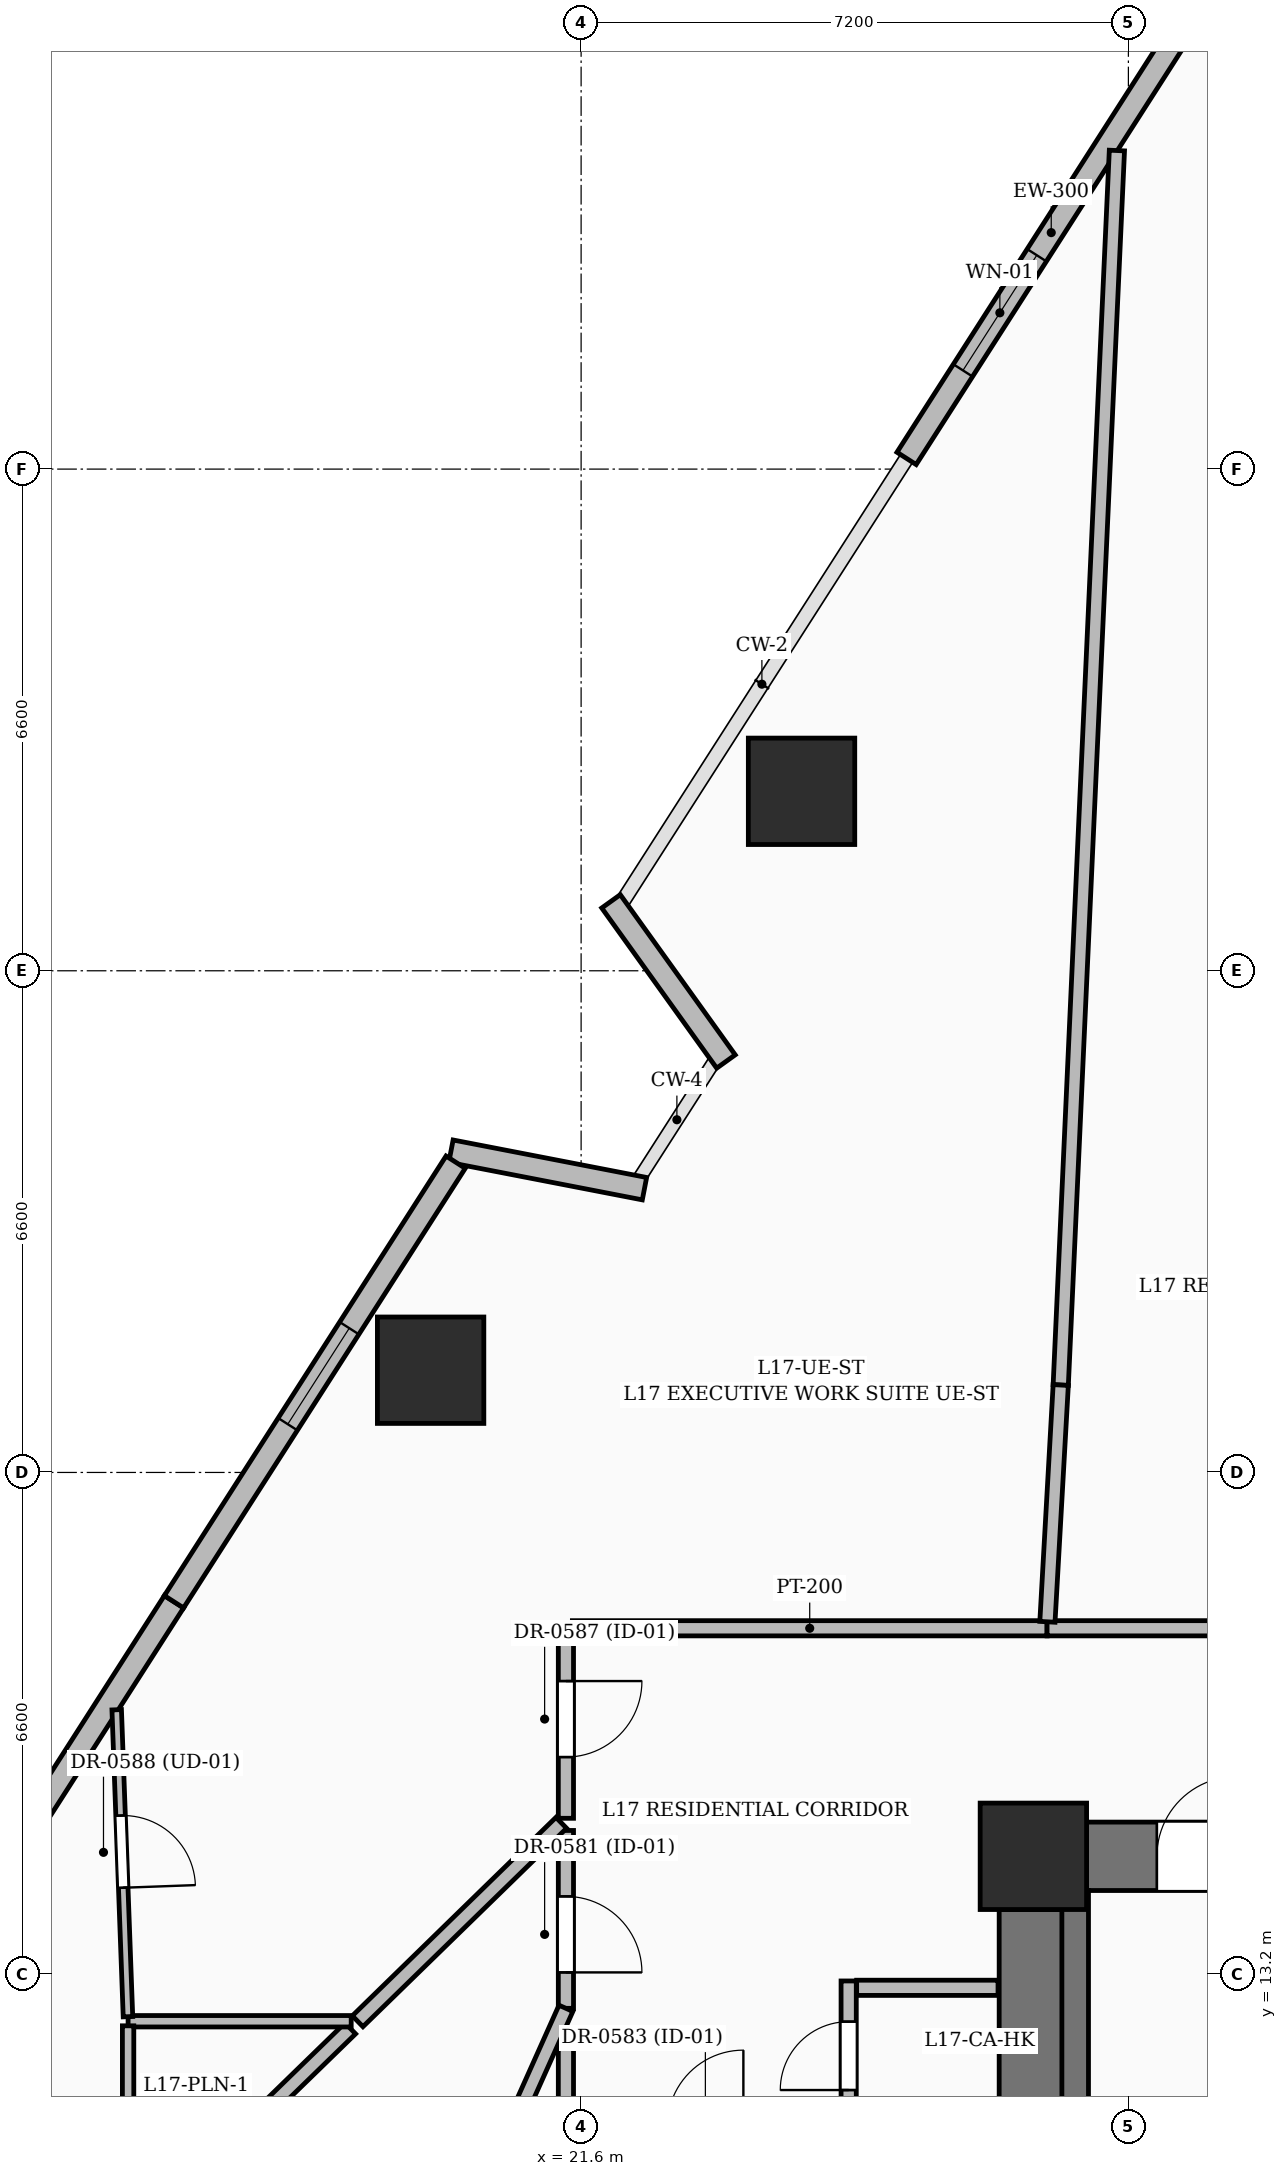
"""IFC4 building model, lengths in metres.
Left out: names, types, materials, properties, quantities, classifications, styles, units other than length and angle.
Written with IfcOpenShell. Run it as: python <this file> out.ifc"""

import sys

from ifc_helpers import new_model, si_unit, direction, frame, frame_2d, origin, origin_2d, place, context, subcontext, project, spatial, rectangle, extrude, element, fill, save


model = new_model("IFC4")
c1 = context("Model", 3, precision=1e-05, world=origin(), true_north=direction((0.0, 1.0)))
c2 = subcontext(c1, "Body", "Model", "MODEL_VIEW")
j1 = project(units=[si_unit("LENGTHUNIT", "METRE"), si_unit("PLANEANGLEUNIT", "RADIAN")], contexts=[c1])
p1 = place(None, origin())
s1 = spatial("IfcSite", under=j1, at=p1, CompositionType="ELEMENT")
p2 = place(p1, origin())
s2 = spatial("IfcBuilding", under=s1, at=p2, CompositionType="ELEMENT")
p3 = place(p2, frame((0.0, 0.0, 71.4)))
s3 = spatial("IfcBuildingStorey", under=s2, at=p3, CompositionType="ELEMENT", Elevation=71.4)
p4 = place(p3, frame((27.55, 14.75, 0.0), z_axis=(0.0, 0.0, 1.0), x_axis=(1.0, 0.0, 0.0)))
e1 = element("IfcColumn", 1, at=p4, inside=s3, PredefinedType="COLUMN", context=c2, shape_type="SweptSolid", body=[
    extrude(rectangle(XDim=1.4, YDim=1.4, at=origin_2d()), origin(), (0.0, 0.0, 1.0), 3.6),
])
p5 = place(p3, frame((28.25, 14.75, 0.0), z_axis=(0.0, 0.0, 1.0), x_axis=(1.0, 0.0, 0.0)))
e2 = element("IfcWall", 2, at=p5, inside=s3, PredefinedType="SHEAR", context=c2, shape_type="SweptSolid", body=[
    extrude(rectangle(XDim=6.2, YDim=0.9, at=frame_2d((3.1, 0.0))), origin(), (0.0, 0.0, 1.0), 3.6),
])
p6 = place(p5, frame((0.925, 0.0, 0.0)))
e3 = element("IfcOpeningElement", 3, at=p6, cuts=e2, PredefinedType="OPENING", context=c2, shape_type="SweptSolid", body=[
    extrude(rectangle(XDim=1.05, YDim=2.15, at=frame_2d((0.525, 1.075))), frame((0.0, 0.46, 0.0), z_axis=(0.0, -1.0, 0.0), x_axis=(1.0, 0.0, 0.0)), (0.0, 0.0, 1.0), 0.92),
])
p7 = place(p3, frame((27.55, 5.25, 0.0), z_axis=(0.0, 0.0, 1.0), x_axis=(0.0, 1.0, 0.0)))
e4 = element("IfcWall", 4, at=p7, inside=s3, PredefinedType="SHEAR", context=c2, shape_type="SweptSolid", body=[
    extrude(rectangle(XDim=8.8, YDim=0.9, at=frame_2d((4.4, 0.0))), origin(), (0.0, 0.0, 1.0), 3.6),
])
p8 = place(p3, frame((28.1, 5.2, 0.0), z_axis=(0.0, 0.0, 1.0), x_axis=(0.0, 1.0, 0.0)))
e5 = element("IfcWall", 5, at=p8, inside=s3, PredefinedType="SOLIDWALL", context=c2, shape_type="SweptSolid", body=[
    extrude(rectangle(XDim=9.1, YDim=0.35, at=frame_2d((4.55, 0.0))), origin(), (0.0, 0.0, 1.0), 3.6),
])
for number, where, z_axis, x_axis in (
    (6, (24.5, 28.761, 0.0), (0.0, 0.0, 1.0), (1.0, 0.0, 0.0)),
    (7, (19.62, 21.145, 0.0), (0.0, 0.0, 1.0), (1.0, 0.0, 0.0)),
):
    element("IfcColumn", number, at=place(p3, frame(where, z_axis=z_axis, x_axis=x_axis)), inside=s3, PredefinedType="COLUMN", context=c2, shape_type="SweptSolid", body=[
        extrude(rectangle(XDim=1.4, YDim=1.4, at=origin_2d()), origin(), (0.0, 0.0, 1.0), 3.6),
    ])
p9 = place(p3, frame((19.888, 24.027, 0.0), z_axis=(0.0, 0.0, 1.0), x_axis=(0.981746971615, -0.190191702567, 0.0)))
e8 = element("IfcWall", 8, at=p9, inside=s3, PredefinedType="SOLIDWALL", context=c2, shape_type="SweptSolid", body=[
    extrude(rectangle(XDim=2.593, YDim=0.3, at=frame_2d((1.296, 0.0))), origin(), (0.0, 0.0, 1.0), 2.375),
])
p10 = place(p3, frame((23.506, 25.206, 0.0), z_axis=(0.0, 0.0, 1.0), x_axis=(-0.58299973372, 0.812472344442, 0.0)))
e9 = element("IfcWall", 9, at=p10, inside=s3, PredefinedType="SOLIDWALL", context=c2, shape_type="SweptSolid", body=[
    extrude(rectangle(XDim=2.594, YDim=0.3, at=frame_2d((1.297, 0.0))), origin(), (0.0, 0.0, 1.0), 2.375),
])
p11 = place(p3, frame((25.882, 33.141, 0.0), z_axis=(0.0, 0.0, 1.0), x_axis=(0.539517071838, 0.841974660661, 0.0)))
e10 = element("IfcWall", 10, at=p11, inside=s3, PredefinedType="SOLIDWALL", context=c2, shape_type="SweptSolid", body=[
    extrude(rectangle(XDim=7.056, YDim=0.3, at=frame_2d((3.528, 0.0))), origin(), (0.0, 0.0, 1.0), 3.35),
])
p12 = place(p11, frame((1.375, 0.0, 0.6)))
e11 = element("IfcOpeningElement", 11, at=p12, cuts=e10, PredefinedType="OPENING", context=c2, shape_type="SweptSolid", body=[
    extrude(rectangle(XDim=1.8, YDim=2.1, at=frame_2d((0.9, 1.05))), frame((0.0, 0.16, 0.0), z_axis=(0.0, -1.0, 0.0), x_axis=(1.0, 0.0, 0.0)), (0.0, 0.0, 1.0), 0.32),
])
p13 = place(p3, frame((12.386, 12.079, 0.0), z_axis=(0.0, 0.0, 1.0), x_axis=(0.539509086386, 0.841979777493, 0.0)))
e12 = element("IfcWall", 12, at=p13, inside=s3, PredefinedType="SOLIDWALL", context=c2, shape_type="SweptSolid", body=[
    extrude(rectangle(XDim=7.149, YDim=0.3, at=frame_2d((3.574, 0.0))), origin(), (0.0, 0.0, 1.0), 3.35),
])
p14 = place(p13, frame((1.85, 0.0, 0.55)))
e13 = element("IfcOpeningElement", 13, at=p14, cuts=e12, PredefinedType="OPENING", context=c2, shape_type="SweptSolid", body=[
    extrude(rectangle(XDim=1.6, YDim=2.2, at=frame_2d((0.8, 1.1))), frame((0.0, 0.16, 0.0), z_axis=(0.0, -1.0, 0.0), x_axis=(1.0, 0.0, 0.0)), (0.0, 0.0, 1.0), 0.32),
])
p15 = place(p3, frame((16.243, 18.099, 0.0), z_axis=(0.0, 0.0, 1.0), x_axis=(0.539533693544, 0.841964009641, 0.0)))
e14 = element("IfcWall", 14, at=p15, inside=s3, PredefinedType="SOLIDWALL", context=c2, shape_type="SweptSolid", body=[
    extrude(rectangle(XDim=6.869, YDim=0.3, at=frame_2d((3.435, 0.0))), origin(), (0.0, 0.0, 1.0), 3.35),
])
p16 = place(p15, frame((2.775, 0.0, 0.6)))
e15 = element("IfcOpeningElement", 15, at=p16, cuts=e14, PredefinedType="OPENING", context=c2, shape_type="SweptSolid", body=[
    extrude(rectangle(XDim=1.5, YDim=2.1, at=frame_2d((0.75, 1.05))), frame((0.0, 0.16, 0.0), z_axis=(0.0, -1.0, 0.0), x_axis=(1.0, 0.0, 0.0)), (0.0, 0.0, 1.0), 0.32),
])
p17 = place(p3, frame((25.12, 11.37, 0.0), z_axis=(0.0, 0.0, 1.0), x_axis=(0.0, 1.0, 0.0)))
e16 = element("IfcWall", 16, at=p17, inside=s3, PredefinedType="PARTITIONING", context=c2, shape_type="SweptSolid", body=[
    extrude(rectangle(XDim=1.74, YDim=0.2, at=frame_2d((0.87, 0.0))), origin(), (0.0, 0.0, 1.0), 3.35),
])
p18 = place(p17, frame((0.305, 0.0, 0.0)))
e17 = element("IfcOpeningElement", 17, at=p18, cuts=e16, PredefinedType="OPENING", context=c2, shape_type="SweptSolid", body=[
    extrude(rectangle(XDim=0.9, YDim=2.1, at=frame_2d((0.45, 1.05))), frame((0.0, 0.11, 0.0), z_axis=(0.0, -1.0, 0.0), x_axis=(1.0, 0.0, 0.0)), (0.0, 0.0, 1.0), 0.22),
])
p19 = place(p3, frame((25.225, 13.02, 0.0), z_axis=(0.0, 0.0, 1.0), x_axis=(1.0, 0.0, 0.0)))
e18 = element("IfcWall", 18, at=p19, inside=s3, PredefinedType="PARTITIONING", context=c2, shape_type="SweptSolid", body=[
    extrude(rectangle(XDim=1.86, YDim=0.2, at=frame_2d((0.93, 0.0))), origin(), (0.0, 0.0, 1.0), 3.35),
])
p20 = place(p3, frame((21.4, 15.09, 0.0), z_axis=(0.0, 0.0, 1.0), x_axis=(0.0, -1.0, 0.0)))
e19 = element("IfcWall", 19, at=p20, inside=s3, PredefinedType="PARTITIONING", context=c2, shape_type="SweptSolid", body=[
    extrude(rectangle(XDim=2.34, YDim=0.2, at=frame_2d((1.17, 0.0))), origin(), (0.0, 0.0, 1.0), 2.86),
])
p21 = place(p20, frame((0.867, 0.0, 0.0)))
e20 = element("IfcOpeningElement", 20, at=p21, cuts=e19, PredefinedType="OPENING", context=c2, shape_type="SweptSolid", body=[
    extrude(rectangle(XDim=1.0, YDim=2.2, at=frame_2d((0.5, 1.1))), frame((0.0, 0.11, 0.0), z_axis=(0.0, -1.0, 0.0), x_axis=(1.0, 0.0, 0.0)), (0.0, 0.0, 1.0), 0.22),
])
p22 = place(p3, frame((21.4, 12.261, 0.0), z_axis=(0.0, 0.0, 1.0), x_axis=(0.0, -1.0, 0.0)))
e21 = element("IfcWall", 21, at=p22, inside=s3, PredefinedType="PARTITIONING", context=c2, shape_type="SweptSolid", body=[
    extrude(rectangle(XDim=1.061, YDim=0.2, at=frame_2d((0.53, 0.0))), origin(), (0.0, 0.0, 1.0), 3.35),
])
p23 = place(p3, frame((21.4, 17.75, 0.0), z_axis=(0.0, 0.0, 1.0), x_axis=(0.0, -1.0, 0.0)))
e22 = element("IfcWall", 22, at=p23, inside=s3, PredefinedType="PARTITIONING", context=c2, shape_type="SweptSolid", body=[
    extrude(rectangle(XDim=2.5, YDim=0.2, at=frame_2d((1.25, 0.0))), origin(), (0.0, 0.0, 1.0), 3.35),
])
p24 = place(p23, frame((0.695, 0.0, 0.0)))
e23 = element("IfcOpeningElement", 23, at=p24, cuts=e22, PredefinedType="OPENING", context=c2, shape_type="SweptSolid", body=[
    extrude(rectangle(XDim=1.0, YDim=2.2, at=frame_2d((0.5, 1.1))), frame((0.0, 0.11, 0.0), z_axis=(0.0, -1.0, 0.0), x_axis=(1.0, 0.0, 0.0)), (0.0, 0.0, 1.0), 0.22),
])
p25 = place(p3, frame((27.73, 17.75, 0.0), z_axis=(0.0, 0.0, 1.0), x_axis=(-1.0, 0.0, 0.0)))
e24 = element("IfcWall", 24, at=p25, inside=s3, PredefinedType="PARTITIONING", context=c2, shape_type="SweptSolid", body=[
    extrude(rectangle(XDim=6.245, YDim=0.2, at=frame_2d((3.123, 0.0))), origin(), (0.0, 0.0, 1.0), 1.12),
])
p26 = place(p3, frame((31.17, 17.75, 0.0), z_axis=(0.0, 0.0, 1.0), x_axis=(-1.0, 0.0, 0.0)))
e25 = element("IfcWall", 25, at=p26, inside=s3, PredefinedType="PARTITIONING", context=c2, shape_type="SweptSolid", body=[
    extrude(rectangle(XDim=3.44, YDim=0.2, at=frame_2d((1.72, 0.0))), origin(), (0.0, 0.0, 1.0), 3.35),
])
p27 = place(p3, frame((18.975, 7.335, 0.0), z_axis=(0.0, 0.0, 1.0), x_axis=(0.408740443591, 0.912650672367, 0.0)))
e26 = element("IfcWall", 26, at=p27, inside=s3, PredefinedType="PARTITIONING", context=c2, shape_type="SweptSolid", body=[
    extrude(rectangle(XDim=5.934, YDim=0.2, at=frame_2d((2.967, 0.0))), origin(), (0.0, 0.0, 1.0), 1.12),
])
p28 = place(p3, frame((21.339, 15.191, 0.0), z_axis=(0.0, 0.0, 1.0), x_axis=(-0.716217041319, -0.697877603684, 0.0)))
e27 = element("IfcWall", 27, at=p28, inside=s3, PredefinedType="PARTITIONING", context=c2, shape_type="SweptSolid", body=[
    extrude(rectangle(XDim=3.741, YDim=0.2, at=frame_2d((1.87, 0.0))), origin(), (0.0, 0.0, 1.0), 3.35),
])
p29 = place(p3, frame((18.563, 12.486, 0.0), z_axis=(0.0, 0.0, 1.0), x_axis=(-0.716909764219, -0.697165970173, 0.0)))
e28 = element("IfcWall", 28, at=p29, inside=s3, PredefinedType="PARTITIONING", context=c2, shape_type="SweptSolid", body=[
    extrude(rectangle(XDim=2.906, YDim=0.2, at=frame_2d((1.453, 0.0))), origin(), (0.0, 0.0, 1.0), 1.12),
])
p30 = place(p3, frame((15.64, 12.58, 0.0), z_axis=(0.0, 0.0, 1.0), x_axis=(1.0, 0.0, 0.0)))
e29 = element("IfcWall", 29, at=p30, inside=s3, PredefinedType="PARTITIONING", context=c2, shape_type="SweptSolid", body=[
    extrude(rectangle(XDim=2.935, YDim=0.15, at=frame_2d((1.468, 0.0))), origin(), (0.0, 0.0, 1.0), 3.35),
])
p31 = place(p3, frame((15.49, 16.678, 0.0), z_axis=(0.0, 0.0, 1.0), x_axis=(0.036674223431, -0.999327274388, 0.0)))
e30 = element("IfcWall", 30, at=p31, inside=s3, PredefinedType="PARTITIONING", context=c2, shape_type="SweptSolid", body=[
    extrude(rectangle(XDim=4.041, YDim=0.125, at=frame_2d((2.021, 0.0))), origin(), (0.0, 0.0, 1.0), 2.37),
])
p32 = place(p31, frame((1.393, 0.0, 0.0)))
e31 = element("IfcOpeningElement", 31, at=p32, cuts=e30, PredefinedType="OPENING", context=c2, shape_type="SweptSolid", body=[
    extrude(rectangle(XDim=0.95, YDim=2.2, at=frame_2d((0.475, 1.1))), frame((0.0, 0.072, 0.0), z_axis=(0.0, -1.0, 0.0), x_axis=(1.0, 0.0, 0.0)), (0.0, 0.0, 1.0), 0.145),
])
p33 = place(p3, frame((15.64, 12.52, 0.0), z_axis=(0.0, 0.0, 1.0), x_axis=(0.0, -1.0, 0.0)))
e32 = element("IfcWall", 32, at=p33, inside=s3, PredefinedType="PARTITIONING", context=c2, shape_type="SweptSolid", body=[
    extrude(rectangle(XDim=2.795, YDim=0.15, at=frame_2d((1.397, 0.0))), origin(), (0.0, 0.0, 1.0), 1.12),
])
p34 = place(p3, frame((27.91, 20.95, 0.0), z_axis=(0.0, 0.0, 1.0), x_axis=(0.045456024432, 0.998966340696, 0.0)))
e33 = element("IfcWall", 33, at=p34, inside=s3, PredefinedType="PARTITIONING", context=c2, shape_type="SweptSolid", body=[
    extrude(rectangle(XDim=16.258, YDim=0.2, at=frame_2d((8.129, 0.0))), origin(), (0.0, 0.0, 1.0), 1.12),
])
p35 = place(p3, frame((27.735, 17.835, 0.0), z_axis=(0.0, 0.0, 1.0), x_axis=(0.056107104776, 0.9984247557, 0.0)))
e34 = element("IfcWall", 34, at=p35, inside=s3, PredefinedType="PARTITIONING", context=c2, shape_type="SweptSolid", body=[
    extrude(rectangle(XDim=3.12, YDim=0.2, at=frame_2d((1.56, 0.0))), origin(), (0.0, 0.0, 1.0), 2.86),
])
p36 = place(p12, origin())
e35 = element("IfcWindow", 35, at=p36, inside=s3, PartitioningType="SINGLE_PANEL", PredefinedType="WINDOW", context=c2, shape_type="SweptSolid", body=[
    extrude(rectangle(XDim=1.8, YDim=2.1, at=frame_2d((0.9, 1.05))), frame((0.0, 0.03, 0.0), z_axis=(0.0, -1.0, 0.0), x_axis=(1.0, 0.0, 0.0)), (0.0, 0.0, 1.0), 0.06),
])
fill(e11, e35)
p37 = place(p16, origin())
e36 = element("IfcWindow", 36, at=p37, inside=s3, PartitioningType="SINGLE_PANEL", PredefinedType="WINDOW", context=c2, shape_type="SweptSolid", body=[
    extrude(rectangle(XDim=1.5, YDim=2.1, at=frame_2d((0.75, 1.05))), frame((0.0, 0.03, 0.0), z_axis=(0.0, -1.0, 0.0), x_axis=(1.0, 0.0, 0.0)), (0.0, 0.0, 1.0), 0.06),
])
fill(e15, e36)
p38 = place(p6, origin())
e37 = element("IfcDoor", 37, at=p38, inside=s3, OperationType="SINGLE_SWING_RIGHT", PredefinedType="DOOR", context=c2, shape_type="SweptSolid", body=[
    extrude(rectangle(XDim=1.05, YDim=2.15, at=frame_2d((0.525, 1.075))), frame((0.0, 0.025, 0.0), z_axis=(0.0, -1.0, 0.0), x_axis=(1.0, 0.0, 0.0)), (0.0, 0.0, 1.0), 0.05),
])
fill(e3, e37)
p39 = place(p18, origin())
e38 = element("IfcDoor", 38, at=p39, inside=s3, OperationType="SINGLE_SWING_LEFT", PredefinedType="DOOR", context=c2, shape_type="SweptSolid", body=[
    extrude(rectangle(XDim=0.9, YDim=2.1, at=frame_2d((0.45, 1.05))), frame((0.0, 0.025, 0.0), z_axis=(0.0, -1.0, 0.0), x_axis=(1.0, 0.0, 0.0)), (0.0, 0.0, 1.0), 0.05),
])
fill(e17, e38)
p40 = place(p21, origin())
e39 = element("IfcDoor", 39, at=p40, inside=s3, OperationType="SINGLE_SWING_RIGHT", PredefinedType="DOOR", context=c2, shape_type="SweptSolid", body=[
    extrude(rectangle(XDim=1.0, YDim=2.2, at=frame_2d((0.5, 1.1))), frame((0.0, 0.025, 0.0), z_axis=(0.0, -1.0, 0.0), x_axis=(1.0, 0.0, 0.0)), (0.0, 0.0, 1.0), 0.05),
])
fill(e20, e39)
p41 = place(p24, origin())
e40 = element("IfcDoor", 40, at=p41, inside=s3, OperationType="SINGLE_SWING_LEFT", PredefinedType="DOOR", context=c2, shape_type="SweptSolid", body=[
    extrude(rectangle(XDim=1.0, YDim=2.2, at=frame_2d((0.5, 1.1))), frame((0.0, 0.025, 0.0), z_axis=(0.0, -1.0, 0.0), x_axis=(1.0, 0.0, 0.0)), (0.0, 0.0, 1.0), 0.05),
])
fill(e23, e40)
p42 = place(p32, origin())
e41 = element("IfcDoor", 41, at=p42, inside=s3, OperationType="SINGLE_SWING_RIGHT", PredefinedType="DOOR", context=c2, shape_type="SweptSolid", body=[
    extrude(rectangle(XDim=0.95, YDim=2.2, at=frame_2d((0.475, 1.1))), frame((0.0, 0.025, 0.0), z_axis=(0.0, -1.0, 0.0), x_axis=(1.0, 0.0, 0.0)), (0.0, 0.0, 1.0), 0.05),
])
fill(e31, e41)
save(model, sys.argv[1])
